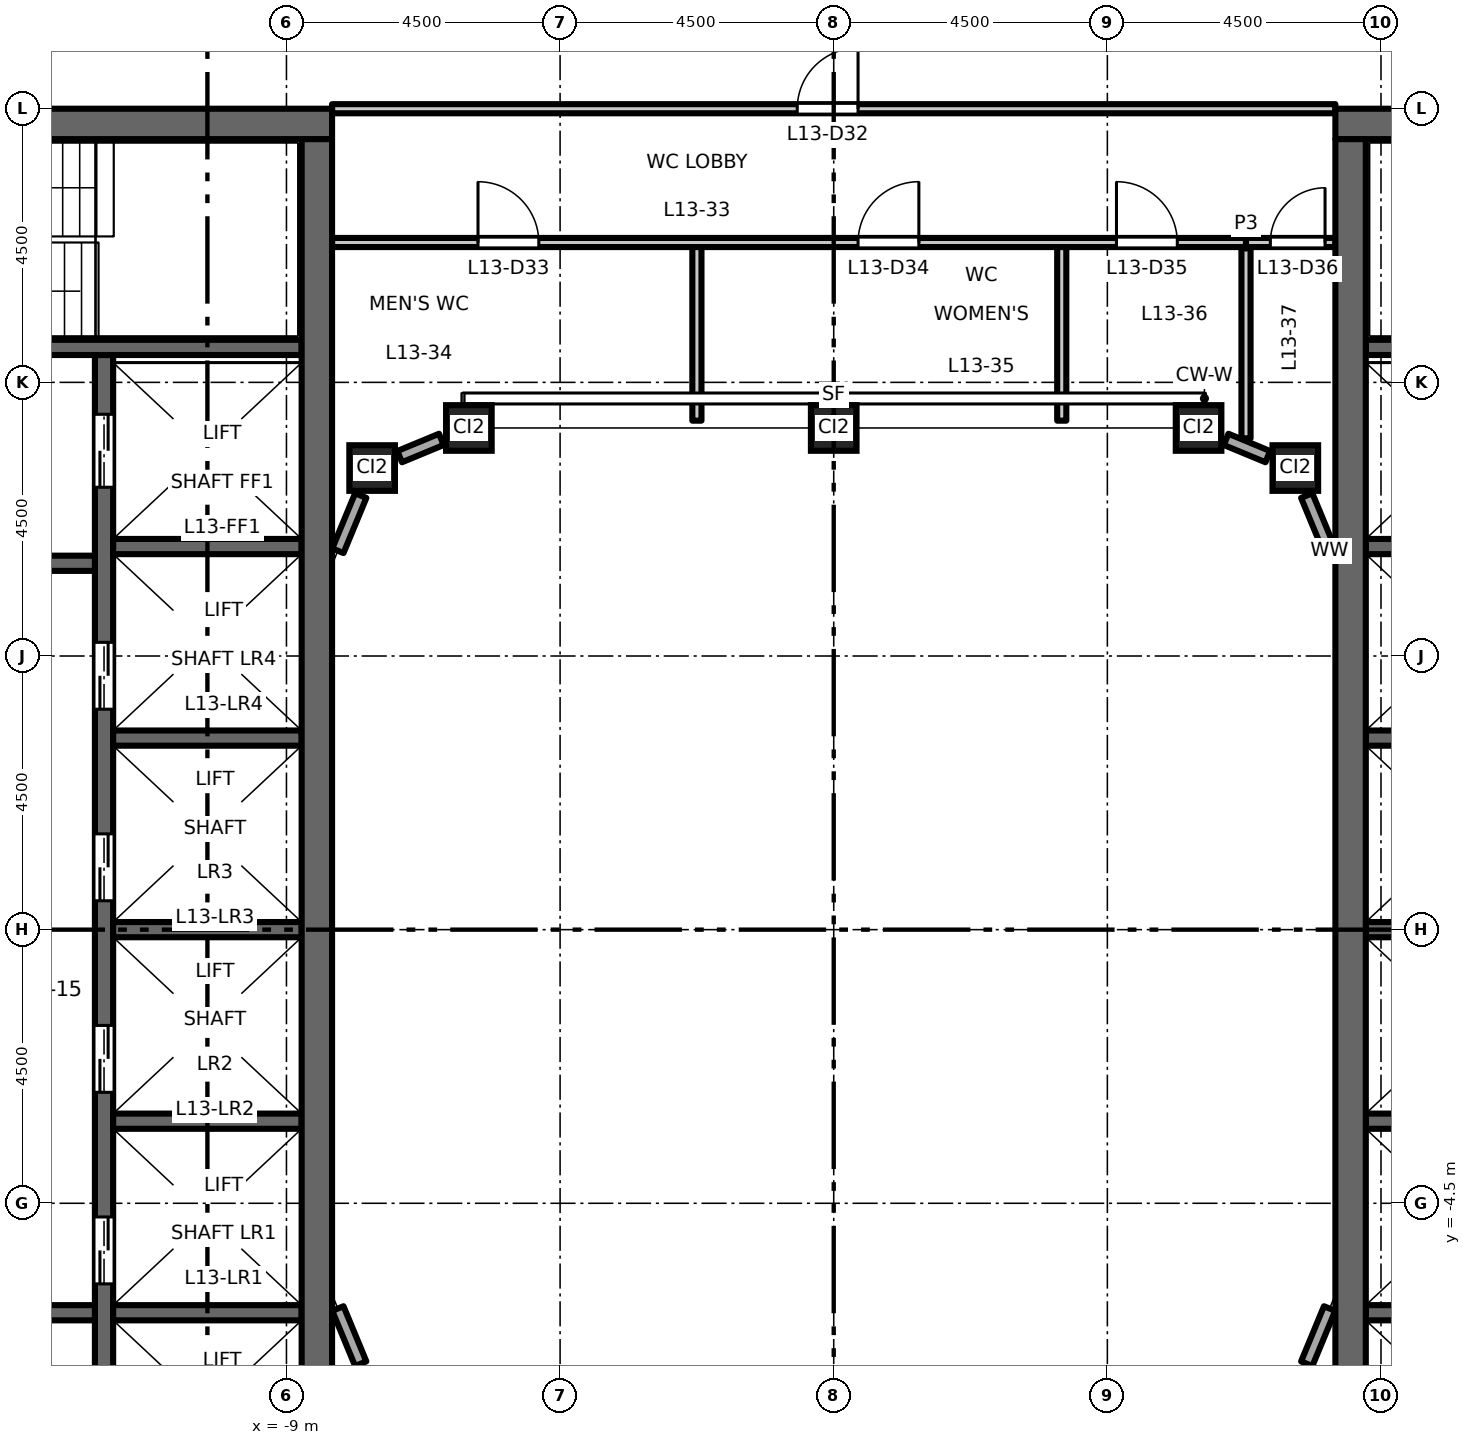
"""IFC4 building model, lengths in metres.
Left out: names, types, materials, properties, quantities, classifications, styles, units other than length and angle.
Written with IfcOpenShell. Run it as: python <this file> out.ifc"""

import sys

from ifc_helpers import new_model, si_unit, direction, frame, frame_2d, origin, origin_2d, place, context, subcontext, project, spatial, rectangle, hollow_rectangle, extrude, element, fill, save


model = new_model("IFC4")
c1 = context("Model", 3, precision=1e-05, world=origin(), true_north=direction((0.0, 1.0)))
c2 = subcontext(c1, "Body", "Model", "MODEL_VIEW")
j1 = project(units=[si_unit("LENGTHUNIT", "METRE"), si_unit("PLANEANGLEUNIT", "RADIAN")], contexts=[c1])
p1 = place(None, origin())
s1 = spatial("IfcSite", under=j1, at=p1, CompositionType="ELEMENT")
p2 = place(p1, origin())
s2 = spatial("IfcBuilding", under=s1, at=p2, CompositionType="ELEMENT")
p3 = place(p2, frame((0.0, 0.0, 62.7)))
s3 = spatial("IfcBuildingStorey", under=s2, at=p3, CompositionType="ELEMENT", Elevation=62.7)
for number, where, z_axis, x_axis in (
    (1, (-7.591, 7.591, 0.0), (0.0, 0.0, 1.0), (1.0, 0.0, 0.0)),
    (2, (-6.0, 8.25, 0.0), (0.0, 0.0, 1.0), (1.0, 0.0, 0.0)),
    (3, (0.0, 8.25, 0.0), (0.0, 0.0, 1.0), (1.0, 0.0, 0.0)),
    (4, (6.0, 8.25, 0.0), (0.0, 0.0, 1.0), (1.0, 0.0, 0.0)),
    (5, (7.591, 7.591, 0.0), (0.0, 0.0, 1.0), (1.0, 0.0, 0.0)),
):
    element("IfcColumn", number, at=place(p3, frame(where, z_axis=z_axis, x_axis=x_axis)), inside=s3, PredefinedType="COLUMN", context=c2, shape_type="SweptSolid", body=[
        extrude(hollow_rectangle(XDim=0.75, YDim=0.75, WallThickness=0.045, at=origin_2d()), origin(), (0.0, 0.0, 1.0), 4.5),
    ])
p4 = place(p3, frame((-12.0, -9.45, 0.0), z_axis=(0.0, 0.0, 1.0), x_axis=(0.0, 1.0, 0.0)))
e6 = element("IfcWall", 6, at=p4, inside=s3, PredefinedType="SHEAR", context=c2, shape_type="SweptSolid", body=[
    extrude(rectangle(XDim=18.9, YDim=0.3, at=frame_2d((9.45, 0.0))), origin(), (0.0, 0.0, 1.0), 4.35),
])
p5 = place(p4, frame((3.625, 0.0, 0.0)))
e7 = element("IfcOpeningElement", 7, at=p5, cuts=e6, PredefinedType="OPENING", context=c2, shape_type="SweptSolid", body=[
    extrude(rectangle(XDim=1.1, YDim=2.1, at=frame_2d((0.55, 1.05))), frame((0.0, 0.16, 0.0), z_axis=(0.0, -1.0, 0.0), x_axis=(1.0, 0.0, 0.0)), (0.0, 0.0, 1.0), 0.32),
])
p6 = place(p4, frame((6.775, 0.0, 0.0)))
e8 = element("IfcOpeningElement", 8, at=p6, cuts=e6, PredefinedType="OPENING", context=c2, shape_type="SweptSolid", body=[
    extrude(rectangle(XDim=1.1, YDim=2.1, at=frame_2d((0.55, 1.05))), frame((0.0, 0.16, 0.0), z_axis=(0.0, -1.0, 0.0), x_axis=(1.0, 0.0, 0.0)), (0.0, 0.0, 1.0), 0.32),
])
p7 = place(p4, frame((9.925, 0.0, 0.0)))
e9 = element("IfcOpeningElement", 9, at=p7, cuts=e6, PredefinedType="OPENING", context=c2, shape_type="SweptSolid", body=[
    extrude(rectangle(XDim=1.1, YDim=2.1, at=frame_2d((0.55, 1.05))), frame((0.0, 0.16, 0.0), z_axis=(0.0, -1.0, 0.0), x_axis=(1.0, 0.0, 0.0)), (0.0, 0.0, 1.0), 0.32),
])
p8 = place(p4, frame((13.075, 0.0, 0.0)))
e10 = element("IfcOpeningElement", 10, at=p8, cuts=e6, PredefinedType="OPENING", context=c2, shape_type="SweptSolid", body=[
    extrude(rectangle(XDim=1.1, YDim=2.1, at=frame_2d((0.55, 1.05))), frame((0.0, 0.16, 0.0), z_axis=(0.0, -1.0, 0.0), x_axis=(1.0, 0.0, 0.0)), (0.0, 0.0, 1.0), 0.32),
])
p9 = place(p4, frame((16.725, 0.0, 0.0)))
e11 = element("IfcOpeningElement", 11, at=p9, cuts=e6, PredefinedType="OPENING", context=c2, shape_type="SweptSolid", body=[
    extrude(rectangle(XDim=1.2, YDim=2.1, at=frame_2d((0.6, 1.05))), frame((0.0, 0.16, 0.0), z_axis=(0.0, -1.0, 0.0), x_axis=(1.0, 0.0, 0.0)), (0.0, 0.0, 1.0), 0.32),
])
p10 = place(p4, frame((0.975, 0.0, 0.0)))
e12 = element("IfcOpeningElement", 12, at=p10, cuts=e6, PredefinedType="OPENING", context=c2, shape_type="SweptSolid", body=[
    extrude(rectangle(XDim=1.2, YDim=2.1, at=frame_2d((0.6, 1.05))), frame((0.0, 0.16, 0.0), z_axis=(0.0, -1.0, 0.0), x_axis=(1.0, 0.0, 0.0)), (0.0, 0.0, 1.0), 0.32),
])
p11 = place(p3, frame((-12.15, 6.025, 0.0), z_axis=(0.0, 0.0, 1.0), x_axis=(-1.0, 0.0, 0.0)))
e13 = element("IfcWall", 13, at=p11, inside=s3, PredefinedType="SHEAR", context=c2, shape_type="SweptSolid", body=[
    extrude(rectangle(XDim=4.6, YDim=0.25, at=frame_2d((2.3, 0.0))), origin(), (0.0, 0.0, 1.0), 4.35),
])
p12 = place(p11, frame((1.8, 0.0, 0.0)))
e14 = element("IfcOpeningElement", 14, at=p12, cuts=e13, PredefinedType="OPENING", context=c2, shape_type="SweptSolid", body=[
    extrude(rectangle(XDim=1.0, YDim=2.1, at=frame_2d((0.5, 1.05))), frame((0.0, 0.135, 0.0), z_axis=(0.0, -1.0, 0.0), x_axis=(1.0, 0.0, 0.0)), (0.0, 0.0, 1.0), 0.27),
])
p13 = place(p3, frame((-12.15, -6.3, 0.0), z_axis=(0.0, 0.0, 1.0), x_axis=(-1.0, 0.0, 0.0)))
e15 = element("IfcWall", 15, at=p13, inside=s3, PredefinedType="SHEAR", context=c2, shape_type="SweptSolid", body=[
    extrude(rectangle(XDim=9.1, YDim=0.25, at=frame_2d((4.55, 0.0))), origin(), (0.0, 0.0, 1.0), 4.35),
])
p14 = place(p13, frame((1.8, 0.0, 0.0)))
e16 = element("IfcOpeningElement", 16, at=p14, cuts=e15, PredefinedType="OPENING", context=c2, shape_type="SweptSolid", body=[
    extrude(rectangle(XDim=1.0, YDim=2.1, at=frame_2d((0.5, 1.05))), frame((0.0, 0.135, 0.0), z_axis=(0.0, -1.0, 0.0), x_axis=(1.0, 0.0, 0.0)), (0.0, 0.0, 1.0), 0.27),
])
p15 = place(p13, frame((6.65, 0.0, 0.0)))
e17 = element("IfcOpeningElement", 17, at=p15, cuts=e15, PredefinedType="OPENING", context=c2, shape_type="SweptSolid", body=[
    extrude(rectangle(XDim=0.9, YDim=2.1, at=frame_2d((0.45, 1.05))), frame((0.0, 0.135, 0.0), z_axis=(0.0, -1.0, 0.0), x_axis=(1.0, 0.0, 0.0)), (0.0, 0.0, 1.0), 0.27),
])
for number, where, z_axis, x_axis in (
    (18, (-8.75, 0.0, 0.0), (0.0, 0.0, 1.0), (-1.0, 0.0, 0.0)),
    (19, (-8.75, 3.15, 0.0), (0.0, 0.0, 1.0), (-1.0, 0.0, 0.0)),
    (20, (-8.75, 6.3, 0.0), (0.0, 0.0, 1.0), (-1.0, 0.0, 0.0)),
    (21, (-8.75, -3.15, 0.0), (0.0, 0.0, 1.0), (-1.0, 0.0, 0.0)),
    (22, (-8.75, -6.3, 0.0), (0.0, 0.0, 1.0), (-1.0, 0.0, 0.0)),
):
    element("IfcWall", number, at=place(p3, frame(where, z_axis=z_axis, x_axis=x_axis)), inside=s3, PredefinedType="SHEAR", context=c2, shape_type="SweptSolid", body=[
        extrude(rectangle(XDim=3.1, YDim=0.25, at=frame_2d((1.55, 0.0))), origin(), (0.0, 0.0, 1.0), 4.35),
    ])
p16 = place(p3, frame((-8.75, 9.575, 0.0), z_axis=(0.0, 0.0, 1.0), x_axis=(-1.0, 0.0, 0.0)))
e23 = element("IfcWall", 23, at=p16, inside=s3, PredefinedType="SHEAR", context=c2, shape_type="SweptSolid", body=[
    extrude(rectangle(XDim=8.0, YDim=0.25, at=frame_2d((4.0, 0.0))), origin(), (0.0, 0.0, 1.0), 4.35),
])
p17 = place(p16, frame((6.65, 0.0, 0.0)))
e24 = element("IfcOpeningElement", 24, at=p17, cuts=e23, PredefinedType="OPENING", context=c2, shape_type="SweptSolid", body=[
    extrude(rectangle(XDim=1.1, YDim=2.1, at=frame_2d((0.55, 1.05))), frame((0.0, 0.135, 0.0), z_axis=(0.0, -1.0, 0.0), x_axis=(1.0, 0.0, 0.0)), (0.0, 0.0, 1.0), 0.27),
])
p18 = place(p3, frame((-8.25, 13.25, 0.0), z_axis=(0.0, 0.0, 1.0), x_axis=(-1.0, 0.0, 0.0)))
e25 = element("IfcWall", 25, at=p18, inside=s3, PredefinedType="SHEAR", context=c2, shape_type="SweptSolid", body=[
    extrude(rectangle(XDim=13.5, YDim=0.5, at=frame_2d((6.75, 0.0))), origin(), (0.0, 0.0, 1.0), 4.35),
])
p19 = place(p3, frame((-8.5, -13.0, 0.0), z_axis=(0.0, 0.0, 1.0), x_axis=(0.0, 1.0, 0.0)))
e26 = element("IfcWall", 26, at=p19, inside=s3, PredefinedType="SHEAR", context=c2, shape_type="SweptSolid", body=[
    extrude(rectangle(XDim=26.0, YDim=0.5, at=frame_2d((13.0, 0.0))), origin(), (0.0, 0.0, 1.0), 4.35),
])
for number, where, z_axis, x_axis in (
    (27, (8.75, 0.0, 0.0), (0.0, 0.0, 1.0), (1.0, 0.0, 0.0)),
    (28, (8.75, 3.15, 0.0), (0.0, 0.0, 1.0), (1.0, 0.0, 0.0)),
    (29, (8.75, 6.3, 0.0), (0.0, 0.0, 1.0), (1.0, 0.0, 0.0)),
    (30, (8.75, -3.15, 0.0), (0.0, 0.0, 1.0), (1.0, 0.0, 0.0)),
    (31, (8.75, -6.3, 0.0), (0.0, 0.0, 1.0), (1.0, 0.0, 0.0)),
):
    element("IfcWall", number, at=place(p3, frame(where, z_axis=z_axis, x_axis=x_axis)), inside=s3, PredefinedType="SHEAR", context=c2, shape_type="SweptSolid", body=[
        extrude(rectangle(XDim=3.1, YDim=0.25, at=frame_2d((1.55, 0.0))), origin(), (0.0, 0.0, 1.0), 4.35),
    ])
p20 = place(p3, frame((8.75, 9.575, 0.0), z_axis=(0.0, 0.0, 1.0), x_axis=(1.0, 0.0, 0.0)))
e32 = element("IfcWall", 32, at=p20, inside=s3, PredefinedType="SHEAR", context=c2, shape_type="SweptSolid", body=[
    extrude(rectangle(XDim=8.0, YDim=0.25, at=frame_2d((4.0, 0.0))), origin(), (0.0, 0.0, 1.0), 4.35),
])
p21 = place(p20, frame((6.65, 0.0, 0.0)))
e33 = element("IfcOpeningElement", 33, at=p21, cuts=e32, PredefinedType="OPENING", context=c2, shape_type="SweptSolid", body=[
    extrude(rectangle(XDim=1.1, YDim=2.1, at=frame_2d((0.55, 1.05))), frame((0.0, 0.135, 0.0), z_axis=(0.0, -1.0, 0.0), x_axis=(1.0, 0.0, 0.0)), (0.0, 0.0, 1.0), 0.27),
])
p22 = place(p3, frame((8.25, 13.25, 0.0), z_axis=(0.0, 0.0, 1.0), x_axis=(1.0, 0.0, 0.0)))
e34 = element("IfcWall", 34, at=p22, inside=s3, PredefinedType="SHEAR", context=c2, shape_type="SweptSolid", body=[
    extrude(rectangle(XDim=13.5, YDim=0.5, at=frame_2d((6.75, 0.0))), origin(), (0.0, 0.0, 1.0), 4.35),
])
p23 = place(p3, frame((8.5, -13.0, 0.0), z_axis=(0.0, 0.0, 1.0), x_axis=(0.0, 1.0, 0.0)))
e35 = element("IfcWall", 35, at=p23, inside=s3, PredefinedType="SHEAR", context=c2, shape_type="SweptSolid", body=[
    extrude(rectangle(XDim=26.0, YDim=0.5, at=frame_2d((13.0, 0.0))), origin(), (0.0, 0.0, 1.0), 4.35),
])
for number, where, z_axis, x_axis in (
    (36, (7.779, -7.138, 0.0), (0.0, 0.0, 1.0), (0.383, 0.924, 0.0)),
    (37, (8.154, 6.231, 0.0), (0.0, 0.0, 1.0), (-0.383, 0.924, 0.0)),
):
    element("IfcWall", number, at=place(p3, frame(where, z_axis=z_axis, x_axis=x_axis)), inside=s3, PredefinedType="STANDARD", context=c2, shape_type="SweptSolid", body=[
        extrude(rectangle(XDim=0.982, YDim=0.2, at=frame_2d((0.491, 0.0))), origin(), (0.0, 0.0, 1.0), 3.73),
    ])
for number, where, z_axis, x_axis in (
    (38, (7.138, 7.779, 0.0), (0.0, 0.0, 1.0), (-0.924, 0.383, 0.0)),
    (39, (-6.453, 8.062, 0.0), (0.0, 0.0, 1.0), (-0.924, -0.383, 0.0)),
):
    element("IfcWall", number, at=place(p3, frame(where, z_axis=z_axis, x_axis=x_axis)), inside=s3, PredefinedType="STANDARD", context=c2, shape_type="SweptSolid", body=[
        extrude(rectangle(XDim=0.742, YDim=0.2, at=frame_2d((0.371, 0.0))), origin(), (0.0, 0.0, 1.0), 3.73),
    ])
for number, where, z_axis, x_axis in (
    (40, (-7.779, 7.138, 0.0), (0.0, 0.0, 1.0), (-0.383, -0.924, 0.0)),
    (41, (-8.154, -6.231, 0.0), (0.0, 0.0, 1.0), (0.383, -0.924, 0.0)),
):
    element("IfcWall", number, at=place(p3, frame(where, z_axis=z_axis, x_axis=x_axis)), inside=s3, PredefinedType="STANDARD", context=c2, shape_type="SweptSolid", body=[
        extrude(rectangle(XDim=0.982, YDim=0.2, at=frame_2d((0.491, 0.0))), origin(), (0.0, 0.0, 1.0), 3.73),
    ])
p24 = place(p3, frame((-8.25, 11.3, 0.0), z_axis=(0.0, 0.0, 1.0), x_axis=(1.0, 0.0, 0.0)))
e42 = element("IfcWall", 42, at=p24, inside=s3, PredefinedType="PARTITIONING", context=c2, shape_type="SweptSolid", body=[
    extrude(rectangle(XDim=15.03, YDim=0.15, at=frame_2d((7.515, 0.0))), origin(), (0.0, 0.0, 1.0), 4.35),
])
p25 = place(p24, frame((2.4, 0.0, 0.0)))
e43 = element("IfcOpeningElement", 43, at=p25, cuts=e42, PredefinedType="OPENING", context=c2, shape_type="SweptSolid", body=[
    extrude(rectangle(XDim=1.0, YDim=2.1, at=frame_2d((0.5, 1.05))), frame((0.0, 0.085, 0.0), z_axis=(0.0, -1.0, 0.0), x_axis=(1.0, 0.0, 0.0)), (0.0, 0.0, 1.0), 0.17),
])
p26 = place(p24, frame((8.65, 0.0, 0.0)))
e44 = element("IfcOpeningElement", 44, at=p26, cuts=e42, PredefinedType="OPENING", context=c2, shape_type="SweptSolid", body=[
    extrude(rectangle(XDim=1.0, YDim=2.1, at=frame_2d((0.5, 1.05))), frame((0.0, 0.085, 0.0), z_axis=(0.0, -1.0, 0.0), x_axis=(1.0, 0.0, 0.0)), (0.0, 0.0, 1.0), 0.17),
])
p27 = place(p24, frame((12.9, 0.0, 0.0)))
e45 = element("IfcOpeningElement", 45, at=p27, cuts=e42, PredefinedType="OPENING", context=c2, shape_type="SweptSolid", body=[
    extrude(rectangle(XDim=1.0, YDim=2.1, at=frame_2d((0.5, 1.05))), frame((0.0, 0.085, 0.0), z_axis=(0.0, -1.0, 0.0), x_axis=(1.0, 0.0, 0.0)), (0.0, 0.0, 1.0), 0.17),
])
p28 = place(p3, frame((6.78, 11.3, 0.0), z_axis=(0.0, 0.0, 1.0), x_axis=(1.0, 0.0, 0.0)))
e46 = element("IfcWall", 46, at=p28, inside=s3, PredefinedType="PARTITIONING", context=c2, shape_type="SweptSolid", body=[
    extrude(rectangle(XDim=1.47, YDim=0.15, at=frame_2d((0.735, 0.0))), origin(), (0.0, 0.0, 1.0), 4.35),
])
p29 = place(p28, frame((0.4, 0.0, 0.0)))
e47 = element("IfcOpeningElement", 47, at=p29, cuts=e46, PredefinedType="OPENING", context=c2, shape_type="SweptSolid", body=[
    extrude(rectangle(XDim=0.9, YDim=2.1, at=frame_2d((0.45, 1.05))), frame((0.0, 0.085, 0.0), z_axis=(0.0, -1.0, 0.0), x_axis=(1.0, 0.0, 0.0)), (0.0, 0.0, 1.0), 0.17),
])
p30 = place(p3, frame((-8.25, 13.5, 0.0), z_axis=(0.0, 0.0, 1.0), x_axis=(1.0, 0.0, 0.0)))
e48 = element("IfcWall", 48, at=p30, inside=s3, PredefinedType="PARTITIONING", context=c2, shape_type="SweptSolid", body=[
    extrude(rectangle(XDim=16.5, YDim=0.15, at=frame_2d((8.25, 0.0))), origin(), (0.0, 0.0, 1.0), 3.85),
])
p31 = place(p30, frame((7.65, 0.0, 0.0)))
e49 = element("IfcOpeningElement", 49, at=p31, cuts=e48, PredefinedType="OPENING", context=c2, shape_type="SweptSolid", body=[
    extrude(rectangle(XDim=1.0, YDim=2.1, at=frame_2d((0.5, 1.05))), frame((0.0, 0.085, 0.0), z_axis=(0.0, -1.0, 0.0), x_axis=(1.0, 0.0, 0.0)), (0.0, 0.0, 1.0), 0.17),
])
for number, where, z_axis, x_axis in (
    (50, (-2.25, 8.37, 0.0), (0.0, 0.0, 1.0), (0.0, 1.0, 0.0)),
    (51, (3.75, 8.37, 0.0), (0.0, 0.0, 1.0), (0.0, 1.0, 0.0)),
):
    element("IfcWall", number, at=place(p3, frame(where, z_axis=z_axis, x_axis=x_axis)), inside=s3, PredefinedType="PARTITIONING", context=c2, shape_type="SweptSolid", body=[
        extrude(rectangle(XDim=2.855, YDim=0.15, at=frame_2d((1.427, 0.0))), origin(), (0.0, 0.0, 1.0), 4.35),
    ])
p32 = place(p3, frame((6.78, 8.079, 0.0), z_axis=(0.0, 0.0, 1.0), x_axis=(0.0, 1.0, 0.0)))
e52 = element("IfcWall", 52, at=p32, inside=s3, PredefinedType="PARTITIONING", context=c2, shape_type="SweptSolid", body=[
    extrude(rectangle(XDim=3.146, YDim=0.15, at=frame_2d((1.573, 0.0))), origin(), (0.0, 0.0, 1.0), 4.35),
])
p33 = place(p5, origin())
e53 = element("IfcDoor", 53, at=p33, inside=s3, OperationType="DOUBLE_DOOR_SLIDING", PredefinedType="DOOR", context=c2, shape_type="SweptSolid", body=[
    extrude(rectangle(XDim=1.1, YDim=2.1, at=frame_2d((0.55, 1.05))), frame((0.0, 0.025, 0.0), z_axis=(0.0, -1.0, 0.0), x_axis=(1.0, 0.0, 0.0)), (0.0, 0.0, 1.0), 0.05),
])
fill(e7, e53)
p34 = place(p6, origin())
e54 = element("IfcDoor", 54, at=p34, inside=s3, OperationType="DOUBLE_DOOR_SLIDING", PredefinedType="DOOR", context=c2, shape_type="SweptSolid", body=[
    extrude(rectangle(XDim=1.1, YDim=2.1, at=frame_2d((0.55, 1.05))), frame((0.0, 0.025, 0.0), z_axis=(0.0, -1.0, 0.0), x_axis=(1.0, 0.0, 0.0)), (0.0, 0.0, 1.0), 0.05),
])
fill(e8, e54)
p35 = place(p7, origin())
e55 = element("IfcDoor", 55, at=p35, inside=s3, OperationType="DOUBLE_DOOR_SLIDING", PredefinedType="DOOR", context=c2, shape_type="SweptSolid", body=[
    extrude(rectangle(XDim=1.1, YDim=2.1, at=frame_2d((0.55, 1.05))), frame((0.0, 0.025, 0.0), z_axis=(0.0, -1.0, 0.0), x_axis=(1.0, 0.0, 0.0)), (0.0, 0.0, 1.0), 0.05),
])
fill(e9, e55)
p36 = place(p8, origin())
e56 = element("IfcDoor", 56, at=p36, inside=s3, OperationType="DOUBLE_DOOR_SLIDING", PredefinedType="DOOR", context=c2, shape_type="SweptSolid", body=[
    extrude(rectangle(XDim=1.1, YDim=2.1, at=frame_2d((0.55, 1.05))), frame((0.0, 0.025, 0.0), z_axis=(0.0, -1.0, 0.0), x_axis=(1.0, 0.0, 0.0)), (0.0, 0.0, 1.0), 0.05),
])
fill(e10, e56)
p37 = place(p9, origin())
e57 = element("IfcDoor", 57, at=p37, inside=s3, OperationType="DOUBLE_DOOR_SLIDING", PredefinedType="DOOR", context=c2, shape_type="SweptSolid", body=[
    extrude(rectangle(XDim=1.2, YDim=2.1, at=frame_2d((0.6, 1.05))), frame((0.0, 0.025, 0.0), z_axis=(0.0, -1.0, 0.0), x_axis=(1.0, 0.0, 0.0)), (0.0, 0.0, 1.0), 0.05),
])
fill(e11, e57)
p38 = place(p31, origin())
e58 = element("IfcDoor", 58, at=p38, inside=s3, OperationType="SINGLE_SWING_RIGHT", PredefinedType="DOOR", context=c2, shape_type="SweptSolid", body=[
    extrude(rectangle(XDim=1.0, YDim=2.1, at=frame_2d((0.5, 1.05))), frame((0.0, 0.025, 0.0), z_axis=(0.0, -1.0, 0.0), x_axis=(1.0, 0.0, 0.0)), (0.0, 0.0, 1.0), 0.05),
])
fill(e49, e58)
p39 = place(p25, origin())
e59 = element("IfcDoor", 59, at=p39, inside=s3, OperationType="SINGLE_SWING_LEFT", PredefinedType="DOOR", context=c2, shape_type="SweptSolid", body=[
    extrude(rectangle(XDim=1.0, YDim=2.1, at=frame_2d((0.5, 1.05))), frame((0.0, 0.025, 0.0), z_axis=(0.0, -1.0, 0.0), x_axis=(1.0, 0.0, 0.0)), (0.0, 0.0, 1.0), 0.05),
])
fill(e43, e59)
p40 = place(p26, origin())
e60 = element("IfcDoor", 60, at=p40, inside=s3, OperationType="SINGLE_SWING_RIGHT", PredefinedType="DOOR", context=c2, shape_type="SweptSolid", body=[
    extrude(rectangle(XDim=1.0, YDim=2.1, at=frame_2d((0.5, 1.05))), frame((0.0, 0.025, 0.0), z_axis=(0.0, -1.0, 0.0), x_axis=(1.0, 0.0, 0.0)), (0.0, 0.0, 1.0), 0.05),
])
fill(e44, e60)
p41 = place(p27, origin())
e61 = element("IfcDoor", 61, at=p41, inside=s3, OperationType="SINGLE_SWING_LEFT", PredefinedType="DOOR", context=c2, shape_type="SweptSolid", body=[
    extrude(rectangle(XDim=1.0, YDim=2.1, at=frame_2d((0.5, 1.05))), frame((0.0, 0.025, 0.0), z_axis=(0.0, -1.0, 0.0), x_axis=(1.0, 0.0, 0.0)), (0.0, 0.0, 1.0), 0.05),
])
fill(e45, e61)
p42 = place(p29, origin())
e62 = element("IfcDoor", 62, at=p42, inside=s3, OperationType="SINGLE_SWING_RIGHT", PredefinedType="DOOR", context=c2, shape_type="SweptSolid", body=[
    extrude(rectangle(XDim=0.9, YDim=2.1, at=frame_2d((0.45, 1.05))), frame((0.0, 0.025, 0.0), z_axis=(0.0, -1.0, 0.0), x_axis=(1.0, 0.0, 0.0)), (0.0, 0.0, 1.0), 0.05),
])
fill(e47, e62)
save(model, sys.argv[1])
